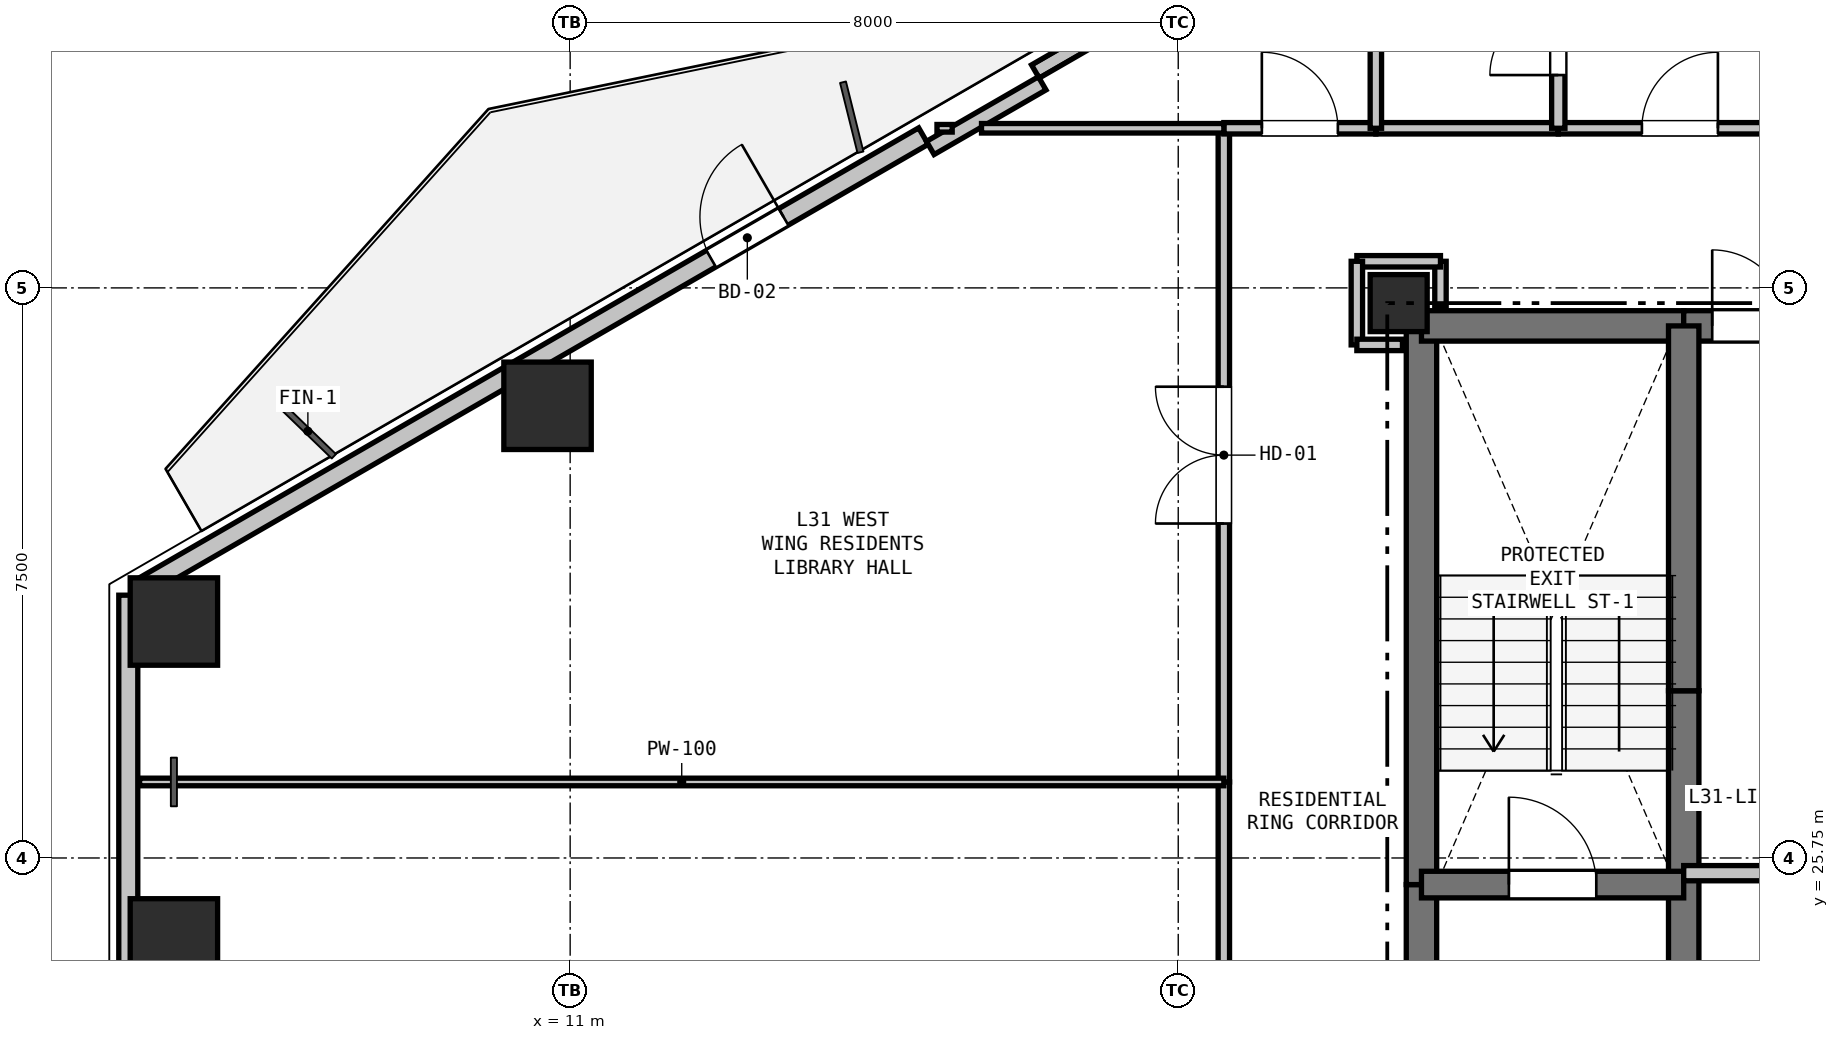
"""IFC4 building model, lengths in metres.
Left out: names, types, materials, properties, quantities, classifications, styles, units other than length and angle.
Written with IfcOpenShell. Run it as: python <this file> out.ifc"""

import sys

from ifc_helpers import new_model, si_unit, direction, frame, frame_2d, origin, origin_2d, place, context, subcontext, project, spatial, rectangle, hollow_rectangle, extrude, element, fill, save


model = new_model("IFC4")
c1 = context("Model", 3, precision=1e-05, world=origin(), true_north=direction((0.0, 1.0)))
c2 = subcontext(c1, "Body", "Model", "MODEL_VIEW")
j1 = project(units=[si_unit("LENGTHUNIT", "METRE"), si_unit("PLANEANGLEUNIT", "RADIAN")], contexts=[c1])
p1 = place(None, origin())
s1 = spatial("IfcSite", under=j1, at=p1, CompositionType="ELEMENT")
p2 = place(p1, origin())
s2 = spatial("IfcBuilding", under=s1, at=p2, CompositionType="ELEMENT")
p3 = place(p2, frame((0.0, 0.0, 113.1)))
s3 = spatial("IfcBuildingStorey", under=s2, at=p3, CompositionType="ELEMENT", Elevation=113.1)
p4 = place(p3, frame((21.9, 33.05, 0.0), z_axis=(0.0, 0.0, 1.0), x_axis=(1.0, 0.0, 0.0)))
e1 = element("IfcColumn", 1, at=p4, inside=s3, PredefinedType="COLUMN", context=c2, shape_type="SweptSolid", body=[
    extrude(rectangle(XDim=0.75, YDim=0.75, at=origin_2d()), origin(), (0.0, 0.0, 1.0), 3.3),
])
for number, where, z_axis, x_axis in (
    (2, (5.787, 28.861, 0.0), (0.0, 0.0, 1.0), (1.0, 0.0, 0.0)),
    (3, (10.702, 31.699, 0.0), (0.0, 0.0, 1.0), (1.0, 0.0, 0.0)),
    (4, (5.787, 24.639, 0.0), (0.0, 0.0, 1.0), (1.0, 0.0, 0.0)),
):
    element("IfcColumn", number, at=place(p3, frame(where, z_axis=z_axis, x_axis=x_axis)), inside=s3, PredefinedType="COLUMN", context=c2, shape_type="SweptSolid", body=[
        extrude(hollow_rectangle(XDim=1.15, YDim=1.15, WallThickness=0.032, at=origin_2d()), origin(), (0.0, 0.0, 1.0), 3.3),
    ])
p5 = place(p3, frame((5.187, 24.293, 0.0), z_axis=(0.0, 0.0, 1.0), x_axis=(0.0, 1.0, 0.0)))
e5 = element("IfcWall", 5, at=p5, inside=s3, PredefinedType="SOLIDWALL", context=c2, shape_type="SweptSolid", body=[
    extrude(rectangle(XDim=4.915, YDim=0.25, at=frame_2d((2.457, 0.0))), origin(), (0.0, 0.0, 1.0), 2.64),
])
p6 = place(p3, frame((5.317, 29.282, 0.0), z_axis=(0.0, 0.0, 1.0), x_axis=(0.866023023012, 0.500004123596, 0.0)))
e6 = element("IfcWall", 6, at=p6, inside=s3, PredefinedType="SOLIDWALL", context=c2, shape_type="SweptSolid", body=[
    extrude(rectangle(XDim=11.93, YDim=0.25, at=frame_2d((5.965, 0.0))), origin(), (0.0, 0.0, 1.0), 2.64),
])
p7 = place(p6, frame((8.704, 0.0, 0.0)))
e7 = element("IfcOpeningElement", 7, at=p7, cuts=e6, PredefinedType="OPENING", context=c2, shape_type="SweptSolid", body=[
    extrude(rectangle(XDim=1.1, YDim=2.1, at=frame_2d((0.55, 1.05))), frame((0.0, 0.135, 0.0), z_axis=(0.0, -1.0, 0.0), x_axis=(1.0, 0.0, 0.0)), (0.0, 0.0, 1.0), 0.27),
])
p8 = place(p3, frame((17.12, 36.097, 0.0), z_axis=(0.0, 0.0, 1.0), x_axis=(0.866027010039, 0.499997217876, 0.0)))
e8 = element("IfcWall", 8, at=p8, inside=s3, PredefinedType="PARAPET", context=c2, shape_type="SweptSolid", body=[
    extrude(rectangle(XDim=11.229, YDim=0.2, at=frame_2d((5.615, 0.0))), origin(), (0.0, 0.0, 1.0), 0.2),
])
p9 = place(p3, frame((15.738, 35.091, 0.0), z_axis=(0.0, 0.0, 1.0), x_axis=(0.866025371046, 0.500000056704, 0.0)))
e9 = element("IfcWall", 9, at=p9, inside=s3, PredefinedType="PARAPET", context=c2, shape_type="SweptSolid", body=[
    extrude(rectangle(XDim=1.7, YDim=0.2, at=frame_2d((0.85, 0.0))), origin(), (0.0, 0.0, 1.0), 2.64),
])
p10 = place(p3, frame((22.2, 20.75, 0.0), z_axis=(0.0, 0.0, 1.0), x_axis=(0.0, 1.0, 0.0)))
e10 = element("IfcWall", 10, at=p10, inside=s3, PredefinedType="SHEAR", context=c2, shape_type="SweptSolid", body=[
    extrude(rectangle(XDim=4.65, YDim=0.4, at=frame_2d((2.325, 0.0))), origin(), (0.0, 0.0, 1.0), 3.02),
])
p11 = place(p3, frame((22.2, 25.4, 0.0), z_axis=(0.0, 0.0, 1.0), x_axis=(0.0, 1.0, 0.0)))
e11 = element("IfcWall", 11, at=p11, inside=s3, PredefinedType="SHEAR", context=c2, shape_type="SweptSolid", body=[
    extrude(rectangle(XDim=7.35, YDim=0.4, at=frame_2d((3.675, 0.0))), origin(), (0.0, 0.0, 1.0), 3.02),
])
p12 = place(p3, frame((22.2, 32.75, 0.0), z_axis=(0.0, 0.0, 1.0), x_axis=(1.0, 0.0, 0.0)))
e12 = element("IfcWall", 12, at=p12, inside=s3, PredefinedType="SHEAR", context=c2, shape_type="SweptSolid", body=[
    extrude(rectangle(XDim=3.45, YDim=0.4, at=frame_2d((1.725, 0.0))), origin(), (0.0, 0.0, 1.0), 3.02),
])
p13 = place(p3, frame((25.65, 32.75, 0.0), z_axis=(0.0, 0.0, 1.0), x_axis=(1.0, 0.0, 0.0)))
e13 = element("IfcWall", 13, at=p13, inside=s3, PredefinedType="SHEAR", context=c2, shape_type="SweptSolid", body=[
    extrude(rectangle(XDim=1.75, YDim=0.4, at=frame_2d((0.875, 0.0))), origin(), (0.0, 0.0, 1.0), 3.02),
])
p14 = place(p13, frame((0.375, 0.0, 0.0)))
e14 = element("IfcOpeningElement", 14, at=p14, cuts=e13, PredefinedType="OPENING", context=c2, shape_type="SweptSolid", body=[
    extrude(rectangle(XDim=1.0, YDim=2.15, at=frame_2d((0.5, 1.075))), frame((0.0, 0.21, 0.0), z_axis=(0.0, -1.0, 0.0), x_axis=(1.0, 0.0, 0.0)), (0.0, 0.0, 1.0), 0.42),
])
p15 = place(p3, frame((25.65, 22.75, 0.0), z_axis=(0.0, 0.0, 1.0), x_axis=(0.0, 1.0, 0.0)))
e15 = element("IfcWall", 15, at=p15, inside=s3, PredefinedType="SHEAR", context=c2, shape_type="SweptSolid", body=[
    extrude(rectangle(XDim=2.8, YDim=0.4, at=frame_2d((1.4, 0.0))), origin(), (0.0, 0.0, 1.0), 3.02),
])
p16 = place(p3, frame((25.65, 25.55, 0.0), z_axis=(0.0, 0.0, 1.0), x_axis=(0.0, 1.0, 0.0)))
e16 = element("IfcWall", 16, at=p16, inside=s3, PredefinedType="SHEAR", context=c2, shape_type="SweptSolid", body=[
    extrude(rectangle(XDim=2.4, YDim=0.4, at=frame_2d((1.2, 0.0))), origin(), (0.0, 0.0, 1.0), 3.02),
])
p17 = place(p3, frame((25.65, 27.95, 0.0), z_axis=(0.0, 0.0, 1.0), x_axis=(0.0, 1.0, 0.0)))
e17 = element("IfcWall", 17, at=p17, inside=s3, PredefinedType="SHEAR", context=c2, shape_type="SweptSolid", body=[
    extrude(rectangle(XDim=4.8, YDim=0.4, at=frame_2d((2.4, 0.0))), origin(), (0.0, 0.0, 1.0), 3.02),
])
p18 = place(p3, frame((22.2, 25.4, 0.0), z_axis=(0.0, 0.0, 1.0), x_axis=(1.0, 0.0, 0.0)))
e18 = element("IfcWall", 18, at=p18, inside=s3, PredefinedType="SHEAR", context=c2, shape_type="SweptSolid", body=[
    extrude(rectangle(XDim=3.45, YDim=0.35, at=frame_2d((1.725, 0.0))), origin(), (0.0, 0.0, 1.0), 3.02),
])
p19 = place(p18, frame((1.15, 0.0, 0.0)))
e19 = element("IfcOpeningElement", 19, at=p19, cuts=e18, PredefinedType="OPENING", context=c2, shape_type="SweptSolid", body=[
    extrude(rectangle(XDim=1.15, YDim=2.15, at=frame_2d((0.575, 1.075))), frame((0.0, 0.185, 0.0), z_axis=(0.0, -1.0, 0.0), x_axis=(1.0, 0.0, 0.0)), (0.0, 0.0, 1.0), 0.37),
])
p20 = place(p3, frame((25.65, 25.55, 0.0), z_axis=(0.0, 0.0, 1.0), x_axis=(1.0, 0.0, 0.0)))
e20 = element("IfcWall", 20, at=p20, inside=s3, PredefinedType="PARTITIONING", context=c2, shape_type="SweptSolid", body=[
    extrude(rectangle(XDim=4.95, YDim=0.2, at=frame_2d((2.475, 0.0))), origin(), (0.0, 0.0, 1.0), 3.02),
])
p21 = place(p3, frame((19.6, 18.15, 0.0), z_axis=(0.0, 0.0, 1.0), x_axis=(0.0, 1.0, 0.0)))
e21 = element("IfcWall", 21, at=p21, inside=s3, PredefinedType="PARTITIONING", context=c2, shape_type="SweptSolid", body=[
    extrude(rectangle(XDim=8.6, YDim=0.15, at=frame_2d((4.3, 0.0))), origin(), (0.0, 0.0, 1.0), 2.393),
])
p22 = place(p21, frame((3.8, 0.0, 0.0)))
e22 = element("IfcOpeningElement", 22, at=p22, cuts=e21, PredefinedType="OPENING", context=c2, shape_type="SweptSolid", body=[
    extrude(rectangle(XDim=1.0, YDim=2.15, at=frame_2d((0.5, 1.075))), frame((0.0, 0.085, 0.0), z_axis=(0.0, -1.0, 0.0), x_axis=(1.0, 0.0, 0.0)), (0.0, 0.0, 1.0), 0.17),
])
p23 = place(p3, frame((19.6, 26.75, 0.0), z_axis=(0.0, 0.0, 1.0), x_axis=(0.0, 1.0, 0.0)))
e23 = element("IfcWall", 23, at=p23, inside=s3, PredefinedType="PARTITIONING", context=c2, shape_type="SweptSolid", body=[
    extrude(rectangle(XDim=8.6, YDim=0.15, at=frame_2d((4.3, 0.0))), origin(), (0.0, 0.0, 1.0), 2.393),
])
p24 = place(p23, frame((3.4, 0.0, 0.0)))
e24 = element("IfcOpeningElement", 24, at=p24, cuts=e23, PredefinedType="OPENING", context=c2, shape_type="SweptSolid", body=[
    extrude(rectangle(XDim=1.8, YDim=2.2, at=frame_2d((0.9, 1.1))), frame((0.0, 0.085, 0.0), z_axis=(0.0, -1.0, 0.0), x_axis=(1.0, 0.0, 0.0)), (0.0, 0.0, 1.0), 0.17),
])
p25 = place(p3, frame((19.6, 35.35, 0.0), z_axis=(0.0, 0.0, 1.0), x_axis=(1.0, 0.0, 0.0)))
e25 = element("IfcWall", 25, at=p25, inside=s3, PredefinedType="PARTITIONING", context=c2, shape_type="SweptSolid", body=[
    extrude(rectangle(XDim=2.0, YDim=0.15, at=frame_2d((1.0, 0.0))), origin(), (0.0, 0.0, 1.0), 3.02),
])
p26 = place(p25, frame((0.5, 0.0, 0.0)))
e26 = element("IfcOpeningElement", 26, at=p26, cuts=e25, PredefinedType="OPENING", context=c2, shape_type="SweptSolid", body=[
    extrude(rectangle(XDim=1.0, YDim=2.15, at=frame_2d((0.5, 1.075))), frame((0.0, 0.085, 0.0), z_axis=(0.0, -1.0, 0.0), x_axis=(1.0, 0.0, 0.0)), (0.0, 0.0, 1.0), 0.17),
])
p27 = place(p3, frame((21.6, 35.35, 0.0), z_axis=(0.0, 0.0, 1.0), x_axis=(1.0, 0.0, 0.0)))
e27 = element("IfcWall", 27, at=p27, inside=s3, PredefinedType="PARTITIONING", context=c2, shape_type="SweptSolid", body=[
    extrude(rectangle(XDim=2.4, YDim=0.15, at=frame_2d((1.2, 0.0))), origin(), (0.0, 0.0, 1.0), 3.02),
])
p28 = place(p3, frame((24.0, 35.35, 0.0), z_axis=(0.0, 0.0, 1.0), x_axis=(1.0, 0.0, 0.0)))
e28 = element("IfcWall", 28, at=p28, inside=s3, PredefinedType="PARTITIONING", context=c2, shape_type="SweptSolid", body=[
    extrude(rectangle(XDim=3.2, YDim=0.15, at=frame_2d((1.6, 0.0))), origin(), (0.0, 0.0, 1.0), 3.02),
])
p29 = place(p28, frame((1.1, 0.0, 0.0)))
e29 = element("IfcOpeningElement", 29, at=p29, cuts=e28, PredefinedType="OPENING", context=c2, shape_type="SweptSolid", body=[
    extrude(rectangle(XDim=1.0, YDim=2.15, at=frame_2d((0.5, 1.075))), frame((0.0, 0.085, 0.0), z_axis=(0.0, -1.0, 0.0), x_axis=(1.0, 0.0, 0.0)), (0.0, 0.0, 1.0), 0.17),
])
p30 = place(p3, frame((22.45, 33.0, 0.0), z_axis=(0.0, 0.0, 1.0), x_axis=(0.0, 1.0, 0.0)))
e30 = element("IfcWall", 30, at=p30, inside=s3, PredefinedType="PARTITIONING", context=c2, shape_type="SweptSolid", body=[
    extrude(rectangle(XDim=0.6, YDim=0.15, at=frame_2d((0.3, 0.0))), origin(), (0.0, 0.0, 1.0), 2.468),
])
p31 = place(p3, frame((22.45, 33.6, 0.0), z_axis=(0.0, 0.0, 1.0), x_axis=(-1.0, 0.0, 0.0)))
e31 = element("IfcWall", 31, at=p31, inside=s3, PredefinedType="PARTITIONING", context=c2, shape_type="SweptSolid", body=[
    extrude(rectangle(XDim=1.1, YDim=0.15, at=frame_2d((0.55, 0.0))), origin(), (0.0, 0.0, 1.0), 3.02),
])
p32 = place(p3, frame((21.35, 33.6, 0.0), z_axis=(0.0, 0.0, 1.0), x_axis=(0.0, -1.0, 0.0)))
e32 = element("IfcWall", 32, at=p32, inside=s3, PredefinedType="PARTITIONING", context=c2, shape_type="SweptSolid", body=[
    extrude(rectangle(XDim=1.1, YDim=0.15, at=frame_2d((0.55, 0.0))), origin(), (0.0, 0.0, 1.0), 2.393),
])
p33 = place(p3, frame((21.35, 32.5, 0.0), z_axis=(0.0, 0.0, 1.0), x_axis=(1.0, 0.0, 0.0)))
e33 = element("IfcWall", 33, at=p33, inside=s3, PredefinedType="PARTITIONING", context=c2, shape_type="SweptSolid", body=[
    extrude(rectangle(XDim=0.6, YDim=0.15, at=frame_2d((0.3, 0.0))), origin(), (0.0, 0.0, 1.0), 2.468),
])
p34 = place(p3, frame((24.0, 35.35, 0.0), z_axis=(0.0, 0.0, 1.0), x_axis=(0.0, 1.0, 0.0)))
e34 = element("IfcWall", 34, at=p34, inside=s3, PredefinedType="PLUMBINGWALL", context=c2, shape_type="SweptSolid", body=[
    extrude(rectangle(XDim=2.3, YDim=0.175, at=frame_2d((1.15, 0.0))), origin(), (0.0, 0.0, 1.0), 3.02),
])
p35 = place(p34, frame((0.7, 0.0, 0.0)))
e35 = element("IfcOpeningElement", 35, at=p35, cuts=e34, PredefinedType="OPENING", context=c2, shape_type="SweptSolid", body=[
    extrude(rectangle(XDim=0.9, YDim=2.1, at=frame_2d((0.45, 1.05))), frame((0.0, 0.097, 0.0), z_axis=(0.0, -1.0, 0.0), x_axis=(1.0, 0.0, 0.0)), (0.0, 0.0, 1.0), 0.195),
])
p36 = place(p3, frame((21.6, 35.35, 0.0), z_axis=(0.0, 0.0, 1.0), x_axis=(0.0, 1.0, 0.0)))
e36 = element("IfcWall", 36, at=p36, inside=s3, PredefinedType="PARTITIONING", context=c2, shape_type="SweptSolid", body=[
    extrude(rectangle(XDim=2.3, YDim=0.15, at=frame_2d((1.15, 0.0))), origin(), (0.0, 0.0, 1.0), 3.02),
])
p37 = place(p3, frame((19.6, 35.35, 0.0), z_axis=(0.0, 0.0, 1.0), x_axis=(-1.0, 0.0, 0.0)))
e37 = element("IfcWall", 37, at=p37, inside=s3, PredefinedType="PARTITIONING", context=c2, shape_type="SweptSolid", body=[
    extrude(rectangle(XDim=3.188, YDim=0.125, at=frame_2d((1.594, 0.0))), origin(), (0.0, 0.0, 1.0), 2.365),
])
p38 = place(p3, frame((16.026, 35.35, 0.0), z_axis=(0.0, 0.0, 1.0), x_axis=(-1.0, 0.0, 0.0)))
e38 = element("IfcWall", 38, at=p38, inside=s3, PredefinedType="PARTITIONING", context=c2, shape_type="SweptSolid", body=[
    extrude(rectangle(XDim=0.2, YDim=0.1, at=frame_2d((0.1, 0.0))), origin(), (0.0, 0.0, 1.0), 3.02),
])
p39 = place(p3, frame((5.336, 26.75, 0.0), z_axis=(0.0, 0.0, 1.0), x_axis=(1.0, 0.0, 0.0)))
e39 = element("IfcWall", 39, at=p39, inside=s3, PredefinedType="PARTITIONING", context=c2, shape_type="SweptSolid", body=[
    extrude(rectangle(XDim=14.264, YDim=0.1, at=frame_2d((7.132, 0.0))), origin(), (0.0, 0.0, 1.0), 2.684),
])
p40 = place(p7, origin())
e40 = element("IfcDoor", 40, at=p40, inside=s3, OperationType="SINGLE_SWING_RIGHT", PredefinedType="DOOR", context=c2, shape_type="SweptSolid", body=[
    extrude(rectangle(XDim=1.1, YDim=2.1, at=frame_2d((0.55, 1.05))), frame((0.0, 0.025, 0.0), z_axis=(0.0, -1.0, 0.0), x_axis=(1.0, 0.0, 0.0)), (0.0, 0.0, 1.0), 0.05),
])
fill(e7, e40)
p41 = place(p14, origin())
e41 = element("IfcDoor", 41, at=p41, inside=s3, OperationType="SINGLE_SWING_LEFT", PredefinedType="DOOR", context=c2, shape_type="SweptSolid", body=[
    extrude(rectangle(XDim=1.0, YDim=2.15, at=frame_2d((0.5, 1.075))), frame((0.0, 0.025, 0.0), z_axis=(0.0, -1.0, 0.0), x_axis=(1.0, 0.0, 0.0)), (0.0, 0.0, 1.0), 0.05),
])
fill(e14, e41)
p42 = place(p19, origin())
e42 = element("IfcDoor", 42, at=p42, inside=s3, OperationType="SINGLE_SWING_LEFT", PredefinedType="DOOR", context=c2, shape_type="SweptSolid", body=[
    extrude(rectangle(XDim=1.15, YDim=2.15, at=frame_2d((0.575, 1.075))), frame((0.0, 0.025, 0.0), z_axis=(0.0, -1.0, 0.0), x_axis=(1.0, 0.0, 0.0)), (0.0, 0.0, 1.0), 0.05),
])
fill(e19, e42)
p43 = place(p29, origin())
e43 = element("IfcDoor", 43, at=p43, inside=s3, OperationType="SINGLE_SWING_RIGHT", PredefinedType="DOOR", context=c2, shape_type="SweptSolid", body=[
    extrude(rectangle(XDim=1.0, YDim=2.15, at=frame_2d((0.5, 1.075))), frame((0.0, 0.025, 0.0), z_axis=(0.0, -1.0, 0.0), x_axis=(1.0, 0.0, 0.0)), (0.0, 0.0, 1.0), 0.05),
])
fill(e29, e43)
p44 = place(p26, origin())
e44 = element("IfcDoor", 44, at=p44, inside=s3, OperationType="SINGLE_SWING_LEFT", PredefinedType="DOOR", context=c2, shape_type="SweptSolid", body=[
    extrude(rectangle(XDim=1.0, YDim=2.15, at=frame_2d((0.5, 1.075))), frame((0.0, 0.025, 0.0), z_axis=(0.0, -1.0, 0.0), x_axis=(1.0, 0.0, 0.0)), (0.0, 0.0, 1.0), 0.05),
])
fill(e26, e44)
p45 = place(p24, origin())
e45 = element("IfcDoor", 45, at=p45, inside=s3, OperationType="DOUBLE_DOOR_SINGLE_SWING", PredefinedType="DOOR", context=c2, shape_type="SweptSolid", body=[
    extrude(rectangle(XDim=1.8, YDim=2.2, at=frame_2d((0.9, 1.1))), frame((0.0, 0.025, 0.0), z_axis=(0.0, -1.0, 0.0), x_axis=(1.0, 0.0, 0.0)), (0.0, 0.0, 1.0), 0.05),
])
fill(e24, e45)
p46 = place(p35, origin())
e46 = element("IfcDoor", 46, at=p46, inside=s3, OperationType="SINGLE_SWING_LEFT", PredefinedType="DOOR", context=c2, shape_type="SweptSolid", body=[
    extrude(rectangle(XDim=0.9, YDim=2.1, at=frame_2d((0.45, 1.05))), frame((0.0, 0.025, 0.0), z_axis=(0.0, -1.0, 0.0), x_axis=(1.0, 0.0, 0.0)), (0.0, 0.0, 1.0), 0.05),
])
fill(e35, e46)
save(model, sys.argv[1])
